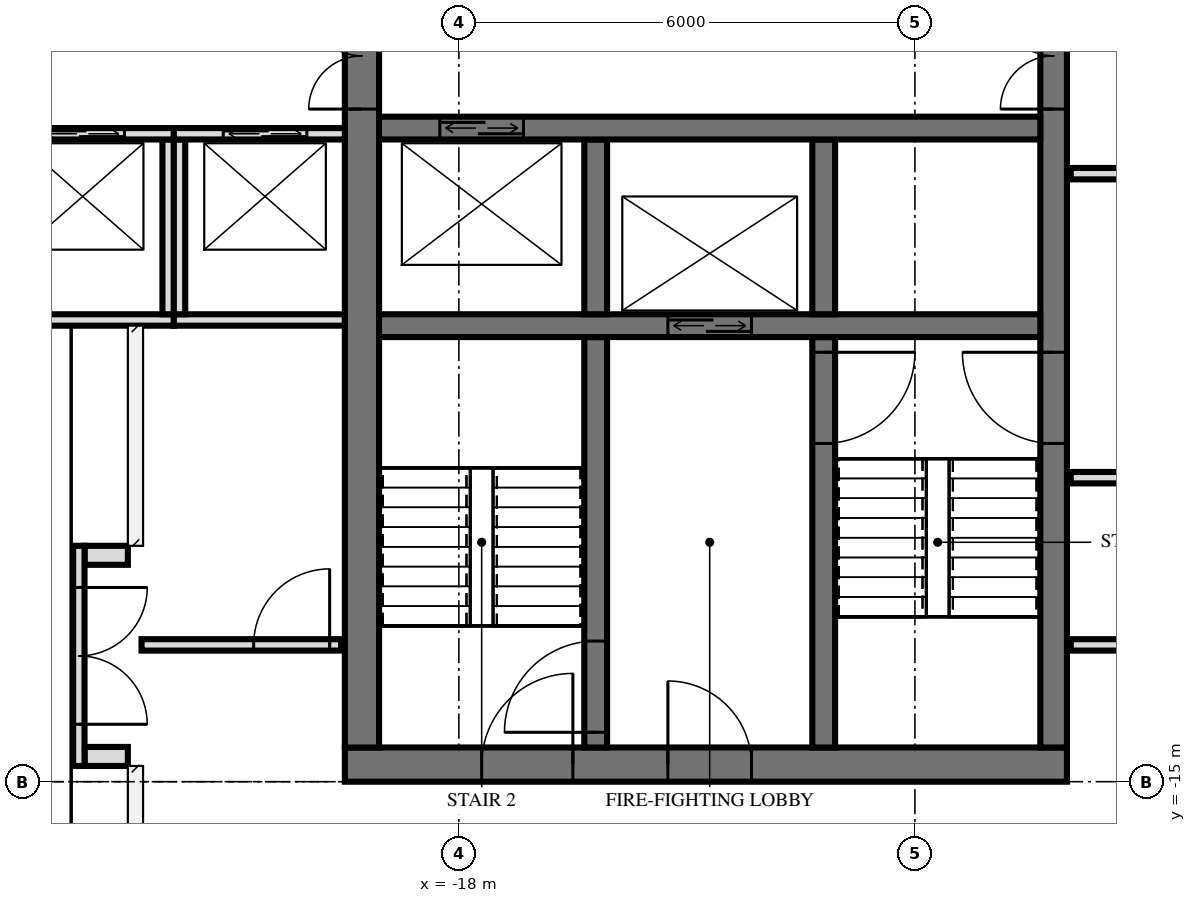
"""IFC4 building model, lengths in metres.
Left out: names, types, materials, properties, quantities, classifications, styles, units other than length and angle.
Written with IfcOpenShell. Run it as: python <this file> out.ifc"""

import sys

from ifc_helpers import new_model, si_unit, direction, frame, frame_2d, origin, place, context, subcontext, project, spatial, rectangle, extrude, element, fill, save


model = new_model("IFC4")
c1 = context("Model", 3, precision=1e-05, world=origin(), true_north=direction((0.0, 1.0)))
c2 = subcontext(c1, "Body", "Model", "MODEL_VIEW")
j1 = project(units=[si_unit("LENGTHUNIT", "METRE"), si_unit("PLANEANGLEUNIT", "RADIAN")], contexts=[c1])
p1 = place(None, origin())
s1 = spatial("IfcSite", under=j1, at=p1, CompositionType="ELEMENT")
p2 = place(p1, origin())
s2 = spatial("IfcBuilding", under=s1, at=p2, CompositionType="ELEMENT")
p3 = place(p2, frame((0.0, 0.0, 246.6)))
s3 = spatial("IfcBuildingStorey", under=s2, at=p3, CompositionType="ELEMENT", Elevation=246.6)
p4 = place(p3, frame((-19.5, -14.775, 0.0), z_axis=(0.0, 0.0, 1.0), x_axis=(1.0, 0.0, 0.0)))
e1 = element("IfcWall", 1, at=p4, inside=s3, PredefinedType="SHEAR", context=c2, shape_type="SweptSolid", body=[
    extrude(rectangle(XDim=9.5, YDim=0.45, at=frame_2d((4.75, 0.0))), origin(), (0.0, 0.0, 1.0), 6.0),
])
p5 = place(p4, frame((1.8, 0.0, 0.0)))
e2 = element("IfcOpeningElement", 2, at=p5, cuts=e1, PredefinedType="OPENING", context=c2, shape_type="SweptSolid", body=[
    extrude(rectangle(XDim=1.2, YDim=2.1, at=frame_2d((0.6, 1.05))), frame((0.0, 0.235, 0.0), z_axis=(0.0, -1.0, 0.0), x_axis=(1.0, 0.0, 0.0)), (0.0, 0.0, 1.0), 0.47),
])
p6 = place(p4, frame((4.25, 0.0, 0.0)))
e3 = element("IfcOpeningElement", 3, at=p6, cuts=e1, PredefinedType="OPENING", context=c2, shape_type="SweptSolid", body=[
    extrude(rectangle(XDim=1.1, YDim=2.1, at=frame_2d((0.55, 1.05))), frame((0.0, 0.235, 0.0), z_axis=(0.0, -1.0, 0.0), x_axis=(1.0, 0.0, 0.0)), (0.0, 0.0, 1.0), 0.47),
])
p7 = place(p3, frame((-10.175, -14.55, 0.0), z_axis=(0.0, 0.0, 1.0), x_axis=(0.0, 1.0, 0.0)))
e4 = element("IfcWall", 4, at=p7, inside=s3, PredefinedType="SHEAR", context=c2, shape_type="SweptSolid", body=[
    extrude(rectangle(XDim=14.1, YDim=0.35, at=frame_2d((7.05, 0.0))), origin(), (0.0, 0.0, 1.0), 6.0),
])
p8 = place(p7, frame((8.4, 0.0, 0.0)))
e5 = element("IfcOpeningElement", 5, at=p8, cuts=e4, PredefinedType="OPENING", context=c2, shape_type="SweptSolid", body=[
    extrude(rectangle(XDim=1.4, YDim=2.4, at=frame_2d((0.7, 1.2))), frame((0.0, 0.185, 0.0), z_axis=(0.0, -1.0, 0.0), x_axis=(1.0, 0.0, 0.0)), (0.0, 0.0, 1.0), 0.37),
])
p9 = place(p7, frame((10.0, 0.0, 0.0)))
e6 = element("IfcOpeningElement", 6, at=p9, cuts=e4, PredefinedType="OPENING", context=c2, shape_type="SweptSolid", body=[
    extrude(rectangle(XDim=1.4, YDim=2.4, at=frame_2d((0.7, 1.2))), frame((0.0, 0.185, 0.0), z_axis=(0.0, -1.0, 0.0), x_axis=(1.0, 0.0, 0.0)), (0.0, 0.0, 1.0), 0.37),
])
p10 = place(p7, frame((4.0, 0.0, 0.0)))
e7 = element("IfcOpeningElement", 7, at=p10, cuts=e4, PredefinedType="OPENING", context=c2, shape_type="SweptSolid", body=[
    extrude(rectangle(XDim=1.2, YDim=2.1, at=frame_2d((0.6, 1.05))), frame((0.0, 0.185, 0.0), z_axis=(0.0, -1.0, 0.0), x_axis=(1.0, 0.0, 0.0)), (0.0, 0.0, 1.0), 0.37),
])
p11 = place(p3, frame((-19.275, -14.55, 0.0), z_axis=(0.0, 0.0, 1.0), x_axis=(0.0, 1.0, 0.0)))
e8 = element("IfcWall", 8, at=p11, inside=s3, PredefinedType="SHEAR", context=c2, shape_type="SweptSolid", body=[
    extrude(rectangle(XDim=14.1, YDim=0.45, at=frame_2d((7.05, 0.0))), origin(), (0.0, 0.0, 1.0), 6.0),
])
p12 = place(p11, frame((8.4, 0.0, 0.0)))
e9 = element("IfcOpeningElement", 9, at=p12, cuts=e8, PredefinedType="OPENING", context=c2, shape_type="SweptSolid", body=[
    extrude(rectangle(XDim=1.4, YDim=2.4, at=frame_2d((0.7, 1.2))), frame((0.0, 0.235, 0.0), z_axis=(0.0, -1.0, 0.0), x_axis=(1.0, 0.0, 0.0)), (0.0, 0.0, 1.0), 0.47),
])
p13 = place(p11, frame((10.0, 0.0, 0.0)))
e10 = element("IfcOpeningElement", 10, at=p13, cuts=e8, PredefinedType="OPENING", context=c2, shape_type="SweptSolid", body=[
    extrude(rectangle(XDim=1.4, YDim=2.4, at=frame_2d((0.7, 1.2))), frame((0.0, 0.235, 0.0), z_axis=(0.0, -1.0, 0.0), x_axis=(1.0, 0.0, 0.0)), (0.0, 0.0, 1.0), 0.47),
])
p14 = place(p3, frame((-19.05, -6.4, 0.0), z_axis=(0.0, 0.0, 1.0), x_axis=(1.0, 0.0, 0.0)))
e11 = element("IfcWall", 11, at=p14, inside=s3, PredefinedType="SHEAR", context=c2, shape_type="SweptSolid", body=[
    extrude(rectangle(XDim=8.7, YDim=0.3, at=frame_2d((4.35, 0.0))), origin(), (0.0, 0.0, 1.0), 6.0),
])
p15 = place(p14, frame((0.8, 0.0, 0.0)))
e12 = element("IfcOpeningElement", 12, at=p15, cuts=e11, PredefinedType="OPENING", context=c2, shape_type="SweptSolid", body=[
    extrude(rectangle(XDim=1.1, YDim=2.1, at=frame_2d((0.55, 1.05))), frame((0.0, 0.16, 0.0), z_axis=(0.0, -1.0, 0.0), x_axis=(1.0, 0.0, 0.0)), (0.0, 0.0, 1.0), 0.32),
])
p16 = place(p3, frame((-19.05, -9.0, 0.0), z_axis=(0.0, 0.0, 1.0), x_axis=(1.0, 0.0, 0.0)))
e13 = element("IfcWall", 13, at=p16, inside=s3, PredefinedType="SHEAR", context=c2, shape_type="SweptSolid", body=[
    extrude(rectangle(XDim=8.7, YDim=0.3, at=frame_2d((4.35, 0.0))), origin(), (0.0, 0.0, 1.0), 6.0),
])
p17 = place(p16, frame((3.8, 0.0, 0.0)))
e14 = element("IfcOpeningElement", 14, at=p17, cuts=e13, PredefinedType="OPENING", context=c2, shape_type="SweptSolid", body=[
    extrude(rectangle(XDim=1.1, YDim=2.1, at=frame_2d((0.55, 1.05))), frame((0.0, 0.16, 0.0), z_axis=(0.0, -1.0, 0.0), x_axis=(1.0, 0.0, 0.0)), (0.0, 0.0, 1.0), 0.32),
])
p18 = place(p3, frame((-13.2, -8.85, 0.0), z_axis=(0.0, 0.0, 1.0), x_axis=(0.0, 1.0, 0.0)))
e15 = element("IfcWall", 15, at=p18, inside=s3, PredefinedType="SHEAR", context=c2, shape_type="SweptSolid", body=[
    extrude(rectangle(XDim=2.3, YDim=0.3, at=frame_2d((1.15, 0.0))), origin(), (0.0, 0.0, 1.0), 6.0),
])
p19 = place(p3, frame((-13.2, -14.55, 0.0), z_axis=(0.0, 0.0, 1.0), x_axis=(0.0, 1.0, 0.0)))
e16 = element("IfcWall", 16, at=p19, inside=s3, PredefinedType="SHEAR", context=c2, shape_type="SweptSolid", body=[
    extrude(rectangle(XDim=5.4, YDim=0.3, at=frame_2d((2.7, 0.0))), origin(), (0.0, 0.0, 1.0), 6.0),
])
p20 = place(p19, frame((4.0, 0.0, 0.0)))
e17 = element("IfcOpeningElement", 17, at=p20, cuts=e16, PredefinedType="OPENING", context=c2, shape_type="SweptSolid", body=[
    extrude(rectangle(XDim=1.2, YDim=2.1, at=frame_2d((0.6, 1.05))), frame((0.0, 0.16, 0.0), z_axis=(0.0, -1.0, 0.0), x_axis=(1.0, 0.0, 0.0)), (0.0, 0.0, 1.0), 0.32),
])
p21 = place(p3, frame((-16.2, -8.85, 0.0), z_axis=(0.0, 0.0, 1.0), x_axis=(0.0, 1.0, 0.0)))
e18 = element("IfcWall", 18, at=p21, inside=s3, PredefinedType="SHEAR", context=c2, shape_type="SweptSolid", body=[
    extrude(rectangle(XDim=2.3, YDim=0.3, at=frame_2d((1.15, 0.0))), origin(), (0.0, 0.0, 1.0), 6.0),
])
p22 = place(p3, frame((-16.2, -14.55, 0.0), z_axis=(0.0, 0.0, 1.0), x_axis=(0.0, 1.0, 0.0)))
e19 = element("IfcWall", 19, at=p22, inside=s3, PredefinedType="SHEAR", context=c2, shape_type="SweptSolid", body=[
    extrude(rectangle(XDim=5.4, YDim=0.3, at=frame_2d((2.7, 0.0))), origin(), (0.0, 0.0, 1.0), 6.0),
])
p23 = place(p22, frame((0.2, 0.0, 0.0)))
e20 = element("IfcOpeningElement", 20, at=p23, cuts=e19, PredefinedType="OPENING", context=c2, shape_type="SweptSolid", body=[
    extrude(rectangle(XDim=1.2, YDim=2.1, at=frame_2d((0.6, 1.05))), frame((0.0, 0.16, 0.0), z_axis=(0.0, -1.0, 0.0), x_axis=(1.0, 0.0, 0.0)), (0.0, 0.0, 1.0), 0.32),
])
for number, where, z_axis, x_axis in (
    (21, (-22.355, -12.021, 0.0), (0.0, 0.0, 1.0), (-1.0, 0.0, 0.0)),
    (22, (-22.355, -14.668, 0.0), (0.0, 0.0, 1.0), (-1.0, 0.0, 0.0)),
):
    element("IfcWall", number, at=place(p3, frame(where, z_axis=z_axis, x_axis=x_axis)), inside=s3, PredefinedType="SOLIDWALL", context=c2, shape_type="SweptSolid", body=[
        extrude(rectangle(XDim=0.57, YDim=0.25, at=frame_2d((0.285, 0.0))), origin(), (0.0, 0.0, 1.0), 5.72),
    ])
p24 = place(p3, frame((-23.0, -11.896, 0.0), z_axis=(0.0, 0.0, 1.0), x_axis=(0.0, -1.0, 0.0)))
e23 = element("IfcWall", 23, at=p24, inside=s3, PredefinedType="USERDEFINED", context=c2, shape_type="SweptSolid", body=[
    extrude(rectangle(XDim=2.896, YDim=0.15, at=frame_2d((1.448, 0.0))), origin(), (0.0, 0.0, 1.0), 5.72),
])
p25 = place(p24, frame((0.548, 0.0, 0.0)))
e24 = element("IfcOpeningElement", 24, at=p25, cuts=e23, PredefinedType="OPENING", context=c2, shape_type="SweptSolid", body=[
    extrude(rectangle(XDim=1.8, YDim=2.4, at=frame_2d((0.9, 1.2))), frame((0.0, 0.085, 0.0), z_axis=(0.0, -1.0, 0.0), x_axis=(1.0, 0.0, 0.0)), (0.0, 0.0, 1.0), 0.17),
])
p26 = place(p3, frame((-21.75, -8.925, 0.0), z_axis=(0.0, 0.0, 1.0), x_axis=(1.0, 0.0, 0.0)))
e25 = element("IfcWall", 25, at=p26, inside=s3, PredefinedType="PARTITIONING", context=c2, shape_type="SweptSolid", body=[
    extrude(rectangle(XDim=2.25, YDim=0.15, at=frame_2d((1.125, 0.0))), origin(), (0.0, 0.0, 1.0), 5.2),
])
p27 = place(p3, frame((-21.75, -6.475, 0.0), z_axis=(0.0, 0.0, 1.0), x_axis=(1.0, 0.0, 0.0)))
e26 = element("IfcWall", 26, at=p27, inside=s3, PredefinedType="PARTITIONING", context=c2, shape_type="SweptSolid", body=[
    extrude(rectangle(XDim=2.25, YDim=0.15, at=frame_2d((1.125, 0.0))), origin(), (0.0, 0.0, 1.0), 5.2),
])
p28 = place(p27, frame((0.65, 0.0, 0.0)))
e27 = element("IfcOpeningElement", 27, at=p28, cuts=e26, PredefinedType="OPENING", context=c2, shape_type="SweptSolid", body=[
    extrude(rectangle(XDim=1.1, YDim=2.1, at=frame_2d((0.55, 1.05))), frame((0.0, 0.085, 0.0), z_axis=(0.0, -1.0, 0.0), x_axis=(1.0, 0.0, 0.0)), (0.0, 0.0, 1.0), 0.17),
])
p29 = place(p3, frame((-21.675, -8.85, 0.0), z_axis=(0.0, 0.0, 1.0), x_axis=(0.0, 1.0, 0.0)))
e28 = element("IfcWall", 28, at=p29, inside=s3, PredefinedType="PARTITIONING", context=c2, shape_type="SweptSolid", body=[
    extrude(rectangle(XDim=2.3, YDim=0.15, at=frame_2d((1.15, 0.0))), origin(), (0.0, 0.0, 1.0), 5.2),
])
p30 = place(p3, frame((-24.15, -8.925, 0.0), z_axis=(0.0, 0.0, 1.0), x_axis=(1.0, 0.0, 0.0)))
e29 = element("IfcWall", 29, at=p30, inside=s3, PredefinedType="PARTITIONING", context=c2, shape_type="SweptSolid", body=[
    extrude(rectangle(XDim=2.4, YDim=0.15, at=frame_2d((1.2, 0.0))), origin(), (0.0, 0.0, 1.0), 5.72),
])
p31 = place(p3, frame((-24.15, -6.475, 0.0), z_axis=(0.0, 0.0, 1.0), x_axis=(1.0, 0.0, 0.0)))
e30 = element("IfcWall", 30, at=p31, inside=s3, PredefinedType="PARTITIONING", context=c2, shape_type="SweptSolid", body=[
    extrude(rectangle(XDim=2.4, YDim=0.15, at=frame_2d((1.2, 0.0))), origin(), (0.0, 0.0, 1.0), 4.6),
])
p32 = place(p31, frame((0.65, 0.0, 0.0)))
e31 = element("IfcOpeningElement", 31, at=p32, cuts=e30, PredefinedType="OPENING", context=c2, shape_type="SweptSolid", body=[
    extrude(rectangle(XDim=1.1, YDim=2.1, at=frame_2d((0.55, 1.05))), frame((0.0, 0.085, 0.0), z_axis=(0.0, -1.0, 0.0), x_axis=(1.0, 0.0, 0.0)), (0.0, 0.0, 1.0), 0.17),
])
p33 = place(p3, frame((-21.825, -8.85, 0.0), z_axis=(0.0, 0.0, 1.0), x_axis=(0.0, 1.0, 0.0)))
e32 = element("IfcWall", 32, at=p33, inside=s3, PredefinedType="PARTITIONING", context=c2, shape_type="SweptSolid", body=[
    extrude(rectangle(XDim=2.3, YDim=0.15, at=frame_2d((1.15, 0.0))), origin(), (0.0, 0.0, 1.0), 4.6),
])
p34 = place(p3, frame((-22.175, -13.2, 0.0), z_axis=(0.0, 0.0, 1.0), x_axis=(1.0, 0.0, 0.0)))
e33 = element("IfcWall", 33, at=p34, inside=s3, PredefinedType="PARTITIONING", context=c2, shape_type="SweptSolid", body=[
    extrude(rectangle(XDim=2.625, YDim=0.15, at=frame_2d((1.312, 0.0))), origin(), (0.0, 0.0, 1.0), 5.7),
])
p35 = place(p34, frame((1.475, 0.0, 0.0)))
e34 = element("IfcOpeningElement", 34, at=p35, cuts=e33, PredefinedType="OPENING", context=c2, shape_type="SweptSolid", body=[
    extrude(rectangle(XDim=1.0, YDim=2.1, at=frame_2d((0.5, 1.05))), frame((0.0, 0.085, 0.0), z_axis=(0.0, -1.0, 0.0), x_axis=(1.0, 0.0, 0.0)), (0.0, 0.0, 1.0), 0.17),
])
p36 = place(p3, frame((-9.95, -13.2, 0.0), z_axis=(0.0, 0.0, 1.0), x_axis=(1.0, 0.0, 0.0)))
e35 = element("IfcWall", 35, at=p36, inside=s3, PredefinedType="PARTITIONING", context=c2, shape_type="SweptSolid", body=[
    extrude(rectangle(XDim=19.9, YDim=0.15, at=frame_2d((9.95, 0.0))), origin(), (0.0, 0.0, 1.0), 5.7),
])
p37 = place(p36, frame((7.0, 0.0, 0.0)))
e36 = element("IfcOpeningElement", 36, at=p37, cuts=e35, PredefinedType="OPENING", context=c2, shape_type="SweptSolid", body=[
    extrude(rectangle(XDim=1.0, YDim=2.1, at=frame_2d((0.5, 1.05))), frame((0.0, 0.085, 0.0), z_axis=(0.0, -1.0, 0.0), x_axis=(1.0, 0.0, 0.0)), (0.0, 0.0, 1.0), 0.17),
])
p38 = place(p3, frame((-9.95, -11.0, 0.0), z_axis=(0.0, 0.0, 1.0), x_axis=(1.0, 0.0, 0.0)))
e37 = element("IfcWall", 37, at=p38, inside=s3, PredefinedType="PARTITIONING", context=c2, shape_type="SweptSolid", body=[
    extrude(rectangle(XDim=19.9, YDim=0.15, at=frame_2d((9.95, 0.0))), origin(), (0.0, 0.0, 1.0), 5.7),
])
p39 = place(p38, frame((9.45, 0.0, 0.0)))
e38 = element("IfcOpeningElement", 38, at=p39, cuts=e37, PredefinedType="OPENING", context=c2, shape_type="SweptSolid", body=[
    extrude(rectangle(XDim=1.0, YDim=2.1, at=frame_2d((0.5, 1.05))), frame((0.0, 0.085, 0.0), z_axis=(0.0, -1.0, 0.0), x_axis=(1.0, 0.0, 0.0)), (0.0, 0.0, 1.0), 0.17),
])
p40 = place(p38, frame((15.45, 0.0, 0.0)))
e39 = element("IfcOpeningElement", 39, at=p40, cuts=e37, PredefinedType="OPENING", context=c2, shape_type="SweptSolid", body=[
    extrude(rectangle(XDim=1.0, YDim=2.1, at=frame_2d((0.5, 1.05))), frame((0.0, 0.085, 0.0), z_axis=(0.0, -1.0, 0.0), x_axis=(1.0, 0.0, 0.0)), (0.0, 0.0, 1.0), 0.17),
])
p41 = place(p3, frame((-9.95, -7.0, 0.0), z_axis=(0.0, 0.0, 1.0), x_axis=(1.0, 0.0, 0.0)))
e40 = element("IfcWall", 40, at=p41, inside=s3, PredefinedType="PARTITIONING", context=c2, shape_type="SweptSolid", body=[
    extrude(rectangle(XDim=19.9, YDim=0.15, at=frame_2d((9.95, 0.0))), origin(), (0.0, 0.0, 1.0), 5.7),
])
p42 = place(p41, frame((9.45, 0.0, 0.0)))
e41 = element("IfcOpeningElement", 41, at=p42, cuts=e40, PredefinedType="OPENING", context=c2, shape_type="SweptSolid", body=[
    extrude(rectangle(XDim=1.0, YDim=2.1, at=frame_2d((0.5, 1.05))), frame((0.0, 0.085, 0.0), z_axis=(0.0, -1.0, 0.0), x_axis=(1.0, 0.0, 0.0)), (0.0, 0.0, 1.0), 0.17),
])
p43 = place(p41, frame((2.0, 0.0, 0.0)))
e42 = element("IfcOpeningElement", 42, at=p43, cuts=e40, PredefinedType="OPENING", context=c2, shape_type="SweptSolid", body=[
    extrude(rectangle(XDim=1.0, YDim=2.1, at=frame_2d((0.5, 1.05))), frame((0.0, 0.085, 0.0), z_axis=(0.0, -1.0, 0.0), x_axis=(1.0, 0.0, 0.0)), (0.0, 0.0, 1.0), 0.17),
])
p44 = place(p25, origin())
e43 = element("IfcDoor", 43, at=p44, inside=s3, OperationType="DOUBLE_DOOR_SINGLE_SWING", PredefinedType="DOOR", context=c2, shape_type="SweptSolid", body=[
    extrude(rectangle(XDim=1.8, YDim=2.4, at=frame_2d((0.9, 1.2))), frame((0.0, 0.025, 0.0), z_axis=(0.0, -1.0, 0.0), x_axis=(1.0, 0.0, 0.0)), (0.0, 0.0, 1.0), 0.05),
])
fill(e24, e43)
p45 = place(p28, origin())
e44 = element("IfcDoor", 44, at=p45, inside=s3, OperationType="DOUBLE_DOOR_SLIDING", PredefinedType="USERDEFINED", context=c2, shape_type="SweptSolid", body=[
    extrude(rectangle(XDim=1.1, YDim=2.1, at=frame_2d((0.55, 1.05))), frame((0.0, 0.025, 0.0), z_axis=(0.0, -1.0, 0.0), x_axis=(1.0, 0.0, 0.0)), (0.0, 0.0, 1.0), 0.05),
])
fill(e27, e44)
p46 = place(p32, origin())
e45 = element("IfcDoor", 45, at=p46, inside=s3, OperationType="DOUBLE_DOOR_SLIDING", PredefinedType="USERDEFINED", context=c2, shape_type="SweptSolid", body=[
    extrude(rectangle(XDim=1.1, YDim=2.1, at=frame_2d((0.55, 1.05))), frame((0.0, 0.025, 0.0), z_axis=(0.0, -1.0, 0.0), x_axis=(1.0, 0.0, 0.0)), (0.0, 0.0, 1.0), 0.05),
])
fill(e31, e45)
p47 = place(p17, origin())
e46 = element("IfcDoor", 46, at=p47, inside=s3, OperationType="DOUBLE_DOOR_SLIDING", PredefinedType="USERDEFINED", context=c2, shape_type="SweptSolid", body=[
    extrude(rectangle(XDim=1.1, YDim=2.1, at=frame_2d((0.55, 1.05))), frame((0.0, 0.025, 0.0), z_axis=(0.0, -1.0, 0.0), x_axis=(1.0, 0.0, 0.0)), (0.0, 0.0, 1.0), 0.05),
])
fill(e14, e46)
p48 = place(p15, origin())
e47 = element("IfcDoor", 47, at=p48, inside=s3, OperationType="DOUBLE_DOOR_SLIDING", PredefinedType="USERDEFINED", context=c2, shape_type="SweptSolid", body=[
    extrude(rectangle(XDim=1.1, YDim=2.1, at=frame_2d((0.55, 1.05))), frame((0.0, 0.025, 0.0), z_axis=(0.0, -1.0, 0.0), x_axis=(1.0, 0.0, 0.0)), (0.0, 0.0, 1.0), 0.05),
])
fill(e12, e47)
p49 = place(p12, origin())
e48 = element("IfcDoor", 48, at=p49, inside=s3, OperationType="DOUBLE_DOOR_SINGLE_SWING", PredefinedType="DOOR", context=c2, shape_type="SweptSolid", body=[
    extrude(rectangle(XDim=1.4, YDim=2.4, at=frame_2d((0.7, 1.2))), frame((0.0, 0.025, 0.0), z_axis=(0.0, -1.0, 0.0), x_axis=(1.0, 0.0, 0.0)), (0.0, 0.0, 1.0), 0.05),
])
fill(e9, e48)
p50 = place(p8, origin())
e49 = element("IfcDoor", 49, at=p50, inside=s3, OperationType="DOUBLE_DOOR_SINGLE_SWING", PredefinedType="DOOR", context=c2, shape_type="SweptSolid", body=[
    extrude(rectangle(XDim=1.4, YDim=2.4, at=frame_2d((0.7, 1.2))), frame((0.0, 0.025, 0.0), z_axis=(0.0, -1.0, 0.0), x_axis=(1.0, 0.0, 0.0)), (0.0, 0.0, 1.0), 0.05),
])
fill(e5, e49)
p51 = place(p10, origin())
e50 = element("IfcDoor", 50, at=p51, inside=s3, OperationType="SINGLE_SWING_LEFT", PredefinedType="DOOR", context=c2, shape_type="SweptSolid", body=[
    extrude(rectangle(XDim=1.2, YDim=2.1, at=frame_2d((0.6, 1.05))), frame((0.0, 0.025, 0.0), z_axis=(0.0, -1.0, 0.0), x_axis=(1.0, 0.0, 0.0)), (0.0, 0.0, 1.0), 0.05),
])
fill(e7, e50)
p52 = place(p5, origin())
e51 = element("IfcDoor", 51, at=p52, inside=s3, OperationType="SINGLE_SWING_LEFT", PredefinedType="DOOR", context=c2, shape_type="SweptSolid", body=[
    extrude(rectangle(XDim=1.2, YDim=2.1, at=frame_2d((0.6, 1.05))), frame((0.0, 0.025, 0.0), z_axis=(0.0, -1.0, 0.0), x_axis=(1.0, 0.0, 0.0)), (0.0, 0.0, 1.0), 0.05),
])
fill(e2, e51)
p53 = place(p6, origin())
e52 = element("IfcDoor", 52, at=p53, inside=s3, OperationType="SINGLE_SWING_RIGHT", PredefinedType="DOOR", context=c2, shape_type="SweptSolid", body=[
    extrude(rectangle(XDim=1.1, YDim=2.1, at=frame_2d((0.55, 1.05))), frame((0.0, 0.025, 0.0), z_axis=(0.0, -1.0, 0.0), x_axis=(1.0, 0.0, 0.0)), (0.0, 0.0, 1.0), 0.05),
])
fill(e3, e52)
p54 = place(p20, frame((0.6, 0.0, 0.0), z_axis=(0.0, 0.0, 1.0), x_axis=(-1.0, 0.0, 0.0)))
e53 = element("IfcDoor", 53, at=p54, inside=s3, OperationType="SINGLE_SWING_RIGHT", PredefinedType="DOOR", context=c2, shape_type="SweptSolid", body=[
    extrude(rectangle(XDim=1.2, YDim=2.1, at=frame_2d((0.0, 1.05))), frame((0.0, -0.025, 0.0), z_axis=(0.0, 1.0, 0.0), x_axis=(-1.0, 0.0, 0.0)), (0.0, 0.0, 1.0), 0.05),
])
fill(e17, e53)
p55 = place(p23, origin())
e54 = element("IfcDoor", 54, at=p55, inside=s3, OperationType="SINGLE_SWING_RIGHT", PredefinedType="DOOR", context=c2, shape_type="SweptSolid", body=[
    extrude(rectangle(XDim=1.2, YDim=2.1, at=frame_2d((0.6, 1.05))), frame((0.0, 0.025, 0.0), z_axis=(0.0, -1.0, 0.0), x_axis=(1.0, 0.0, 0.0)), (0.0, 0.0, 1.0), 0.05),
])
fill(e20, e54)
p56 = place(p35, origin())
e55 = element("IfcDoor", 55, at=p56, inside=s3, OperationType="SINGLE_SWING_LEFT", PredefinedType="DOOR", context=c2, shape_type="SweptSolid", body=[
    extrude(rectangle(XDim=1.0, YDim=2.1, at=frame_2d((0.5, 1.05))), frame((0.0, 0.025, 0.0), z_axis=(0.0, -1.0, 0.0), x_axis=(1.0, 0.0, 0.0)), (0.0, 0.0, 1.0), 0.05),
])
fill(e34, e55)
save(model, sys.argv[1])
